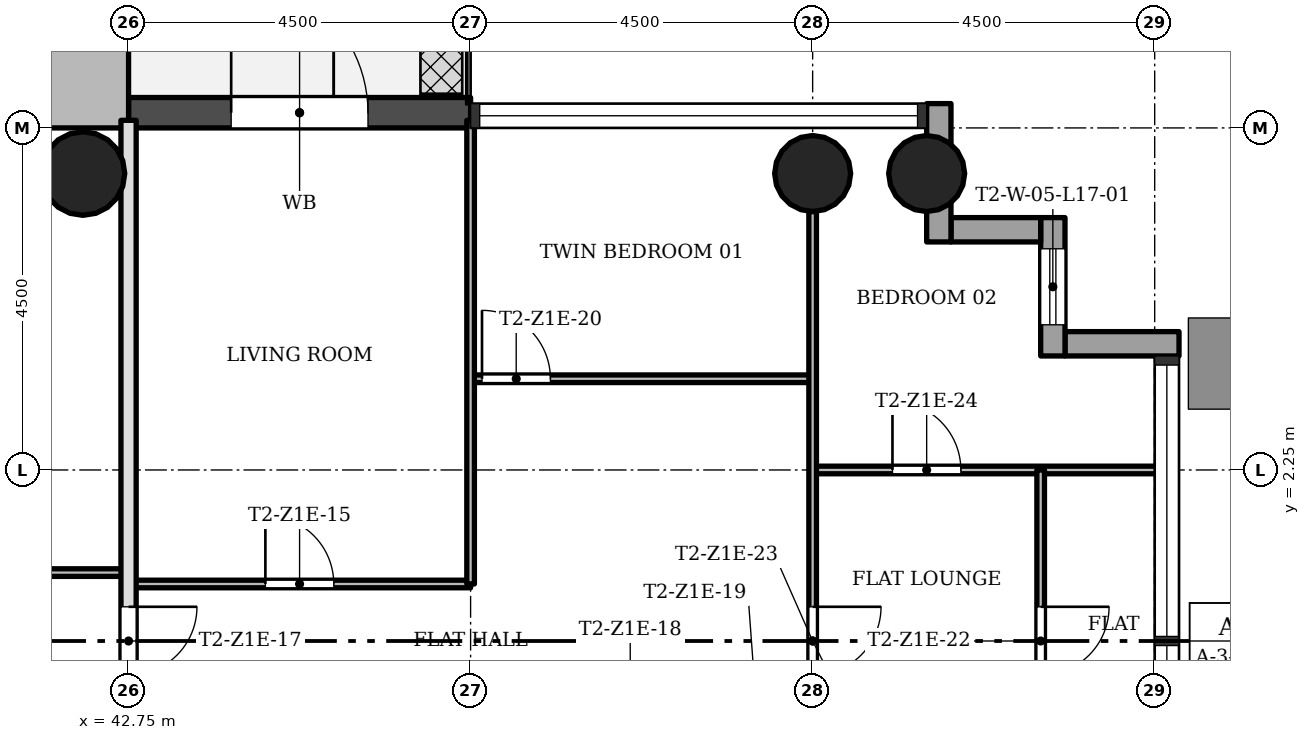
"""IFC4 building model, lengths in metres.
Left out: names, types, materials, properties, quantities, classifications, styles, units other than length and angle.
Written with IfcOpenShell. Run it as: python <this file> out.ifc"""

import sys

from ifc_helpers import new_model, si_unit, direction, frame, frame_2d, origin, origin_2d, place, context, subcontext, project, spatial, rectangle, hollow_circle, extrude, element, fill, save


model = new_model("IFC4")
c1 = context("Model", 3, precision=1e-05, world=origin(), true_north=direction((0.0, 1.0)))
c2 = subcontext(c1, "Body", "Model", "MODEL_VIEW")
j1 = project(units=[si_unit("LENGTHUNIT", "METRE"), si_unit("PLANEANGLEUNIT", "RADIAN")], contexts=[c1])
p1 = place(None, origin())
s1 = spatial("IfcSite", under=j1, at=p1, CompositionType="ELEMENT")
p2 = place(p1, origin())
s2 = spatial("IfcBuilding", under=s1, at=p2, CompositionType="ELEMENT")
p3 = place(p2, frame((0.0, 0.0, 65.3)))
s3 = spatial("IfcBuildingStorey", under=s2, at=p3, CompositionType="ELEMENT", Elevation=65.3)
p4 = place(p3, frame((30.35, 7.3, 0.0), z_axis=(0.0, 0.0, 1.0), x_axis=(1.0, 0.0, 0.0)))
e1 = element("IfcWall", 1, at=p4, inside=s3, PredefinedType="SHEAR", context=c2, shape_type="SweptSolid", body=[
    extrude(rectangle(XDim=12.4, YDim=1.1, at=frame_2d((6.2, 0.0))), origin(), (0.0, 0.0, 1.0), 3.4),
])
p5 = place(p4, frame((4.75, 0.0, 0.0)))
e2 = element("IfcOpeningElement", 2, at=p5, cuts=e1, PredefinedType="OPENING", context=c2, shape_type="SweptSolid", body=[
    extrude(rectangle(XDim=1.8, YDim=2.1, at=frame_2d((0.9, 1.05))), frame((0.0, 0.56, 0.0), z_axis=(0.0, -1.0, 0.0), x_axis=(1.0, 0.0, 0.0)), (0.0, 0.0, 1.0), 1.12),
])
for number, where, z_axis, x_axis in (
    (3, (51.75, 6.15, 0.0), (0.0, 0.0, 1.0), (1.0, 0.0, 0.0)),
    (4, (53.25, 6.15, 0.0), (0.0, 0.0, 1.0), (1.0, 0.0, 0.0)),
):
    element("IfcColumn", number, at=place(p3, frame(where, z_axis=z_axis, x_axis=x_axis)), inside=s3, PredefinedType="COLUMN", context=c2, shape_type="SweptSolid", body=[
        extrude(hollow_circle(Radius=0.5, WallThickness=0.036, at=origin_2d()), origin(), (0.0, 0.0, 1.0), 3.4),
    ])
p6 = place(p3, frame((42.15, 6.15, 0.0), z_axis=(0.0, 0.0, 1.0), x_axis=(1.0, 0.0, 0.0)))
e5 = element("IfcColumn", 5, at=p6, inside=s3, PredefinedType="COLUMN", context=c2, shape_type="SweptSolid", body=[
    extrude(hollow_circle(Radius=0.55, WallThickness=0.04, at=origin_2d()), origin(), (0.0, 0.0, 1.0), 3.4),
])
p7 = place(p3, frame((56.57, 3.91, -0.3), z_axis=(0.0, 0.0, 1.0), x_axis=(-1.0, 0.0, 0.0)))
e6 = element("IfcWall", 6, at=p7, inside=s3, PredefinedType="STANDARD", context=c2, shape_type="SweptSolid", body=[
    extrude(rectangle(XDim=1.5, YDim=0.32, at=frame_2d((0.75, 0.0))), origin(), (0.0, 0.0, 1.0), 3.4),
])
p8 = place(p3, frame((54.91, 3.75, -0.3), z_axis=(0.0, 0.0, 1.0), x_axis=(0.0, 1.0, 0.0)))
e7 = element("IfcWall", 7, at=p8, inside=s3, PredefinedType="STANDARD", context=c2, shape_type="SweptSolid", body=[
    extrude(rectangle(XDim=1.82, YDim=0.32, at=frame_2d((0.91, 0.0))), origin(), (0.0, 0.0, 1.0), 3.4),
])
p9 = place(p8, frame((0.41, 0.0, 1.2)))
e8 = element("IfcOpeningElement", 8, at=p9, cuts=e7, PredefinedType="OPENING", context=c2, shape_type="SweptSolid", body=[
    extrude(rectangle(XDim=1.0, YDim=1.5, at=frame_2d((0.5, 0.75))), frame((0.0, 0.17, 0.0), z_axis=(0.0, -1.0, 0.0), x_axis=(1.0, 0.0, 0.0)), (0.0, 0.0, 1.0), 0.34),
])
p10 = place(p3, frame((54.75, 5.41, -0.3), z_axis=(0.0, 0.0, 1.0), x_axis=(-1.0, 0.0, 0.0)))
e9 = element("IfcWall", 9, at=p10, inside=s3, PredefinedType="STANDARD", context=c2, shape_type="SweptSolid", body=[
    extrude(rectangle(XDim=1.18, YDim=0.32, at=frame_2d((0.59, 0.0))), origin(), (0.0, 0.0, 1.0), 3.4),
])
p11 = place(p3, frame((53.41, 5.25, -0.3), z_axis=(0.0, 0.0, 1.0), x_axis=(0.0, 1.0, 0.0)))
e10 = element("IfcWall", 10, at=p11, inside=s3, PredefinedType="STANDARD", context=c2, shape_type="SweptSolid", body=[
    extrude(rectangle(XDim=1.82, YDim=0.32, at=frame_2d((0.91, 0.0))), origin(), (0.0, 0.0, 1.0), 3.4),
])
p12 = place(p3, frame((47.25, 6.95, -0.02), z_axis=(0.0, 0.0, 1.0), x_axis=(-1.0, 0.0, 0.0)))
e11 = element("IfcWall", 11, at=p12, inside=s3, PredefinedType="STANDARD", context=c2, shape_type="SweptSolid", body=[
    extrude(rectangle(XDim=4.5, YDim=0.4, at=frame_2d((2.25, 0.0))), origin(), (0.0, 0.0, 1.0), 3.12),
])
p13 = place(p12, frame((1.35, 0.0, 0.02)))
e12 = element("IfcOpeningElement", 12, at=p13, cuts=e11, PredefinedType="OPENING", context=c2, shape_type="SweptSolid", body=[
    extrude(rectangle(XDim=1.8, YDim=2.1, at=frame_2d((0.9, 1.05))), frame((0.0, 0.21, 0.0), z_axis=(0.0, -1.0, 0.0), x_axis=(1.0, 0.0, 0.0)), (0.0, 0.0, 1.0), 0.42),
])
p14 = place(p3, frame((47.25, 0.75, 0.0), z_axis=(0.0, 0.0, 1.0), x_axis=(-1.0, 0.0, 0.0)))
e13 = element("IfcWall", 13, at=p14, inside=s3, PredefinedType="PARTITIONING", context=c2, shape_type="SweptSolid", body=[
    extrude(rectangle(XDim=4.5, YDim=0.1, at=frame_2d((2.25, 0.0))), origin(), (0.0, 0.0, 1.0), 3.0),
])
p15 = place(p14, frame((1.8, 0.0, 0.0)))
e14 = element("IfcOpeningElement", 14, at=p15, cuts=e13, PredefinedType="OPENING", context=c2, shape_type="SweptSolid", body=[
    extrude(rectangle(XDim=0.9, YDim=2.1, at=frame_2d((0.45, 1.05))), frame((0.0, 0.06, 0.0), z_axis=(0.0, -1.0, 0.0), x_axis=(1.0, 0.0, 0.0)), (0.0, 0.0, 1.0), 0.12),
])
p16 = place(p3, frame((42.75, 0.9, 0.0), z_axis=(0.0, 0.0, 1.0), x_axis=(-1.0, 0.0, 0.0)))
e15 = element("IfcWall", 15, at=p16, inside=s3, PredefinedType="PARTITIONING", context=c2, shape_type="SweptSolid", body=[
    extrude(rectangle(XDim=5.25, YDim=0.1, at=frame_2d((2.625, 0.0))), origin(), (0.0, 0.0, 1.0), 3.0),
])
p17 = place(p3, frame((56.35, 2.25, 0.0), z_axis=(0.0, 0.0, 1.0), x_axis=(-1.0, 0.0, 0.0)))
e16 = element("IfcWall", 16, at=p17, inside=s3, PredefinedType="PARTITIONING", context=c2, shape_type="SweptSolid", body=[
    extrude(rectangle(XDim=4.6, YDim=0.1, at=frame_2d((2.3, 0.0))), origin(), (0.0, 0.0, 1.0), 3.0),
])
p18 = place(p17, frame((2.65, 0.0, 0.0)))
e17 = element("IfcOpeningElement", 17, at=p18, cuts=e16, PredefinedType="OPENING", context=c2, shape_type="SweptSolid", body=[
    extrude(rectangle(XDim=0.9, YDim=2.1, at=frame_2d((0.45, 1.05))), frame((0.0, 0.06, 0.0), z_axis=(0.0, -1.0, 0.0), x_axis=(1.0, 0.0, 0.0)), (0.0, 0.0, 1.0), 0.12),
])
p19 = place(p3, frame((51.75, 3.45, 0.0), z_axis=(0.0, 0.0, 1.0), x_axis=(-1.0, 0.0, 0.0)))
e18 = element("IfcWall", 18, at=p19, inside=s3, PredefinedType="PARTITIONING", context=c2, shape_type="SweptSolid", body=[
    extrude(rectangle(XDim=4.5, YDim=0.1, at=frame_2d((2.25, 0.0))), origin(), (0.0, 0.0, 1.0), 3.0),
])
p20 = place(p19, frame((3.45, 0.0, 0.0)))
e19 = element("IfcOpeningElement", 19, at=p20, cuts=e18, PredefinedType="OPENING", context=c2, shape_type="SweptSolid", body=[
    extrude(rectangle(XDim=0.9, YDim=2.1, at=frame_2d((0.45, 1.05))), frame((0.0, 0.06, 0.0), z_axis=(0.0, -1.0, 0.0), x_axis=(1.0, 0.0, 0.0)), (0.0, 0.0, 1.0), 0.12),
])
p21 = place(p3, frame((54.75, -2.25, 0.0), z_axis=(0.0, 0.0, 1.0), x_axis=(0.0, 1.0, 0.0)))
e20 = element("IfcWall", 20, at=p21, inside=s3, PredefinedType="PARTITIONING", context=c2, shape_type="SweptSolid", body=[
    extrude(rectangle(XDim=4.5, YDim=0.1, at=frame_2d((2.25, 0.0))), origin(), (0.0, 0.0, 1.0), 3.0),
])
p22 = place(p21, frame((1.8, 0.0, 0.0)))
e21 = element("IfcOpeningElement", 21, at=p22, cuts=e20, PredefinedType="OPENING", context=c2, shape_type="SweptSolid", body=[
    extrude(rectangle(XDim=0.9, YDim=2.1, at=frame_2d((0.45, 1.05))), frame((0.0, 0.06, 0.0), z_axis=(0.0, -1.0, 0.0), x_axis=(1.0, 0.0, 0.0)), (0.0, 0.0, 1.0), 0.12),
])
p23 = place(p3, frame((51.75, -5.65, 0.0), z_axis=(0.0, 0.0, 1.0), x_axis=(0.0, 1.0, 0.0)))
e22 = element("IfcWall", 22, at=p23, inside=s3, PredefinedType="PARTITIONING", context=c2, shape_type="SweptSolid", body=[
    extrude(rectangle(XDim=11.3, YDim=0.1, at=frame_2d((5.65, 0.0))), origin(), (0.0, 0.0, 1.0), 3.0),
])
p24 = place(p23, frame((5.2, 0.0, 0.0)))
e23 = element("IfcOpeningElement", 23, at=p24, cuts=e22, PredefinedType="OPENING", context=c2, shape_type="SweptSolid", body=[
    extrude(rectangle(XDim=0.9, YDim=2.1, at=frame_2d((0.45, 1.05))), frame((0.0, 0.06, 0.0), z_axis=(0.0, -1.0, 0.0), x_axis=(1.0, 0.0, 0.0)), (0.0, 0.0, 1.0), 0.12),
])
p25 = place(p3, frame((47.25, 0.75, 0.0), z_axis=(0.0, 0.0, 1.0), x_axis=(0.0, 1.0, 0.0)))
e24 = element("IfcWall", 24, at=p25, inside=s3, PredefinedType="PARTITIONING", context=c2, shape_type="SweptSolid", body=[
    extrude(rectangle(XDim=6.1, YDim=0.1, at=frame_2d((3.05, 0.0))), origin(), (0.0, 0.0, 1.0), 3.0),
])
p26 = place(p3, frame((42.75, -6.85, 0.0), z_axis=(0.0, 0.0, 1.0), x_axis=(0.0, 1.0, 0.0)))
e25 = element("IfcWall", 25, at=p26, inside=s3, PredefinedType="SOLIDWALL", context=c2, shape_type="SweptSolid", body=[
    extrude(rectangle(XDim=13.7, YDim=0.2, at=frame_2d((6.85, 0.0))), origin(), (0.0, 0.0, 1.0), 3.0),
])
p27 = place(p26, frame((6.4, 0.0, 0.0)))
e26 = element("IfcOpeningElement", 26, at=p27, cuts=e25, PredefinedType="OPENING", context=c2, shape_type="SweptSolid", body=[
    extrude(rectangle(XDim=0.9, YDim=2.1, at=frame_2d((0.45, 1.05))), frame((0.0, 0.11, 0.0), z_axis=(0.0, -1.0, 0.0), x_axis=(1.0, 0.0, 0.0)), (0.0, 0.0, 1.0), 0.22),
])
p28 = place(p13, origin())
e27 = element("IfcDoor", 27, at=p28, inside=s3, OperationType="SINGLE_SWING_RIGHT", PredefinedType="DOOR", context=c2, shape_type="SweptSolid", body=[
    extrude(rectangle(XDim=1.8, YDim=2.1, at=frame_2d((0.9, 1.05))), frame((0.0, 0.025, 0.0), z_axis=(0.0, -1.0, 0.0), x_axis=(1.0, 0.0, 0.0)), (0.0, 0.0, 1.0), 0.05),
])
fill(e12, e27)
p29 = place(p15, origin())
e28 = element("IfcDoor", 28, at=p29, inside=s3, OperationType="SINGLE_SWING_RIGHT", PredefinedType="DOOR", context=c2, shape_type="SweptSolid", body=[
    extrude(rectangle(XDim=0.9, YDim=2.1, at=frame_2d((0.45, 1.05))), frame((0.0, 0.025, 0.0), z_axis=(0.0, -1.0, 0.0), x_axis=(1.0, 0.0, 0.0)), (0.0, 0.0, 1.0), 0.05),
])
fill(e14, e28)
p30 = place(p27, origin())
e29 = element("IfcDoor", 29, at=p30, inside=s3, OperationType="SINGLE_SWING_RIGHT", PredefinedType="DOOR", context=c2, shape_type="SweptSolid", body=[
    extrude(rectangle(XDim=0.9, YDim=2.1, at=frame_2d((0.45, 1.05))), frame((0.0, 0.025, 0.0), z_axis=(0.0, -1.0, 0.0), x_axis=(1.0, 0.0, 0.0)), (0.0, 0.0, 1.0), 0.05),
])
fill(e26, e29)
p31 = place(p20, origin())
e30 = element("IfcDoor", 30, at=p31, inside=s3, OperationType="SINGLE_SWING_RIGHT", PredefinedType="DOOR", context=c2, shape_type="SweptSolid", body=[
    extrude(rectangle(XDim=0.9, YDim=2.1, at=frame_2d((0.45, 1.05))), frame((0.0, 0.025, 0.0), z_axis=(0.0, -1.0, 0.0), x_axis=(1.0, 0.0, 0.0)), (0.0, 0.0, 1.0), 0.05),
])
fill(e19, e30)
p32 = place(p22, origin())
e31 = element("IfcDoor", 31, at=p32, inside=s3, OperationType="SINGLE_SWING_RIGHT", PredefinedType="DOOR", context=c2, shape_type="SweptSolid", body=[
    extrude(rectangle(XDim=0.9, YDim=2.1, at=frame_2d((0.45, 1.05))), frame((0.0, 0.025, 0.0), z_axis=(0.0, -1.0, 0.0), x_axis=(1.0, 0.0, 0.0)), (0.0, 0.0, 1.0), 0.05),
])
fill(e21, e31)
p33 = place(p24, origin())
e32 = element("IfcDoor", 32, at=p33, inside=s3, OperationType="SINGLE_SWING_RIGHT", PredefinedType="DOOR", context=c2, shape_type="SweptSolid", body=[
    extrude(rectangle(XDim=0.9, YDim=2.1, at=frame_2d((0.45, 1.05))), frame((0.0, 0.025, 0.0), z_axis=(0.0, -1.0, 0.0), x_axis=(1.0, 0.0, 0.0)), (0.0, 0.0, 1.0), 0.05),
])
fill(e23, e32)
p34 = place(p18, origin())
e33 = element("IfcDoor", 33, at=p34, inside=s3, OperationType="SINGLE_SWING_RIGHT", PredefinedType="DOOR", context=c2, shape_type="SweptSolid", body=[
    extrude(rectangle(XDim=0.9, YDim=2.1, at=frame_2d((0.45, 1.05))), frame((0.0, 0.025, 0.0), z_axis=(0.0, -1.0, 0.0), x_axis=(1.0, 0.0, 0.0)), (0.0, 0.0, 1.0), 0.05),
])
fill(e17, e33)
p35 = place(p9, origin())
e34 = element("IfcWindow", 34, at=p35, inside=s3, PartitioningType="SINGLE_PANEL", PredefinedType="WINDOW", context=c2, shape_type="SweptSolid", body=[
    extrude(rectangle(XDim=1.0, YDim=1.5, at=frame_2d((0.5, 0.75))), frame((0.0, 0.03, 0.0), z_axis=(0.0, -1.0, 0.0), x_axis=(1.0, 0.0, 0.0)), (0.0, 0.0, 1.0), 0.06),
])
fill(e8, e34)
save(model, sys.argv[1])
